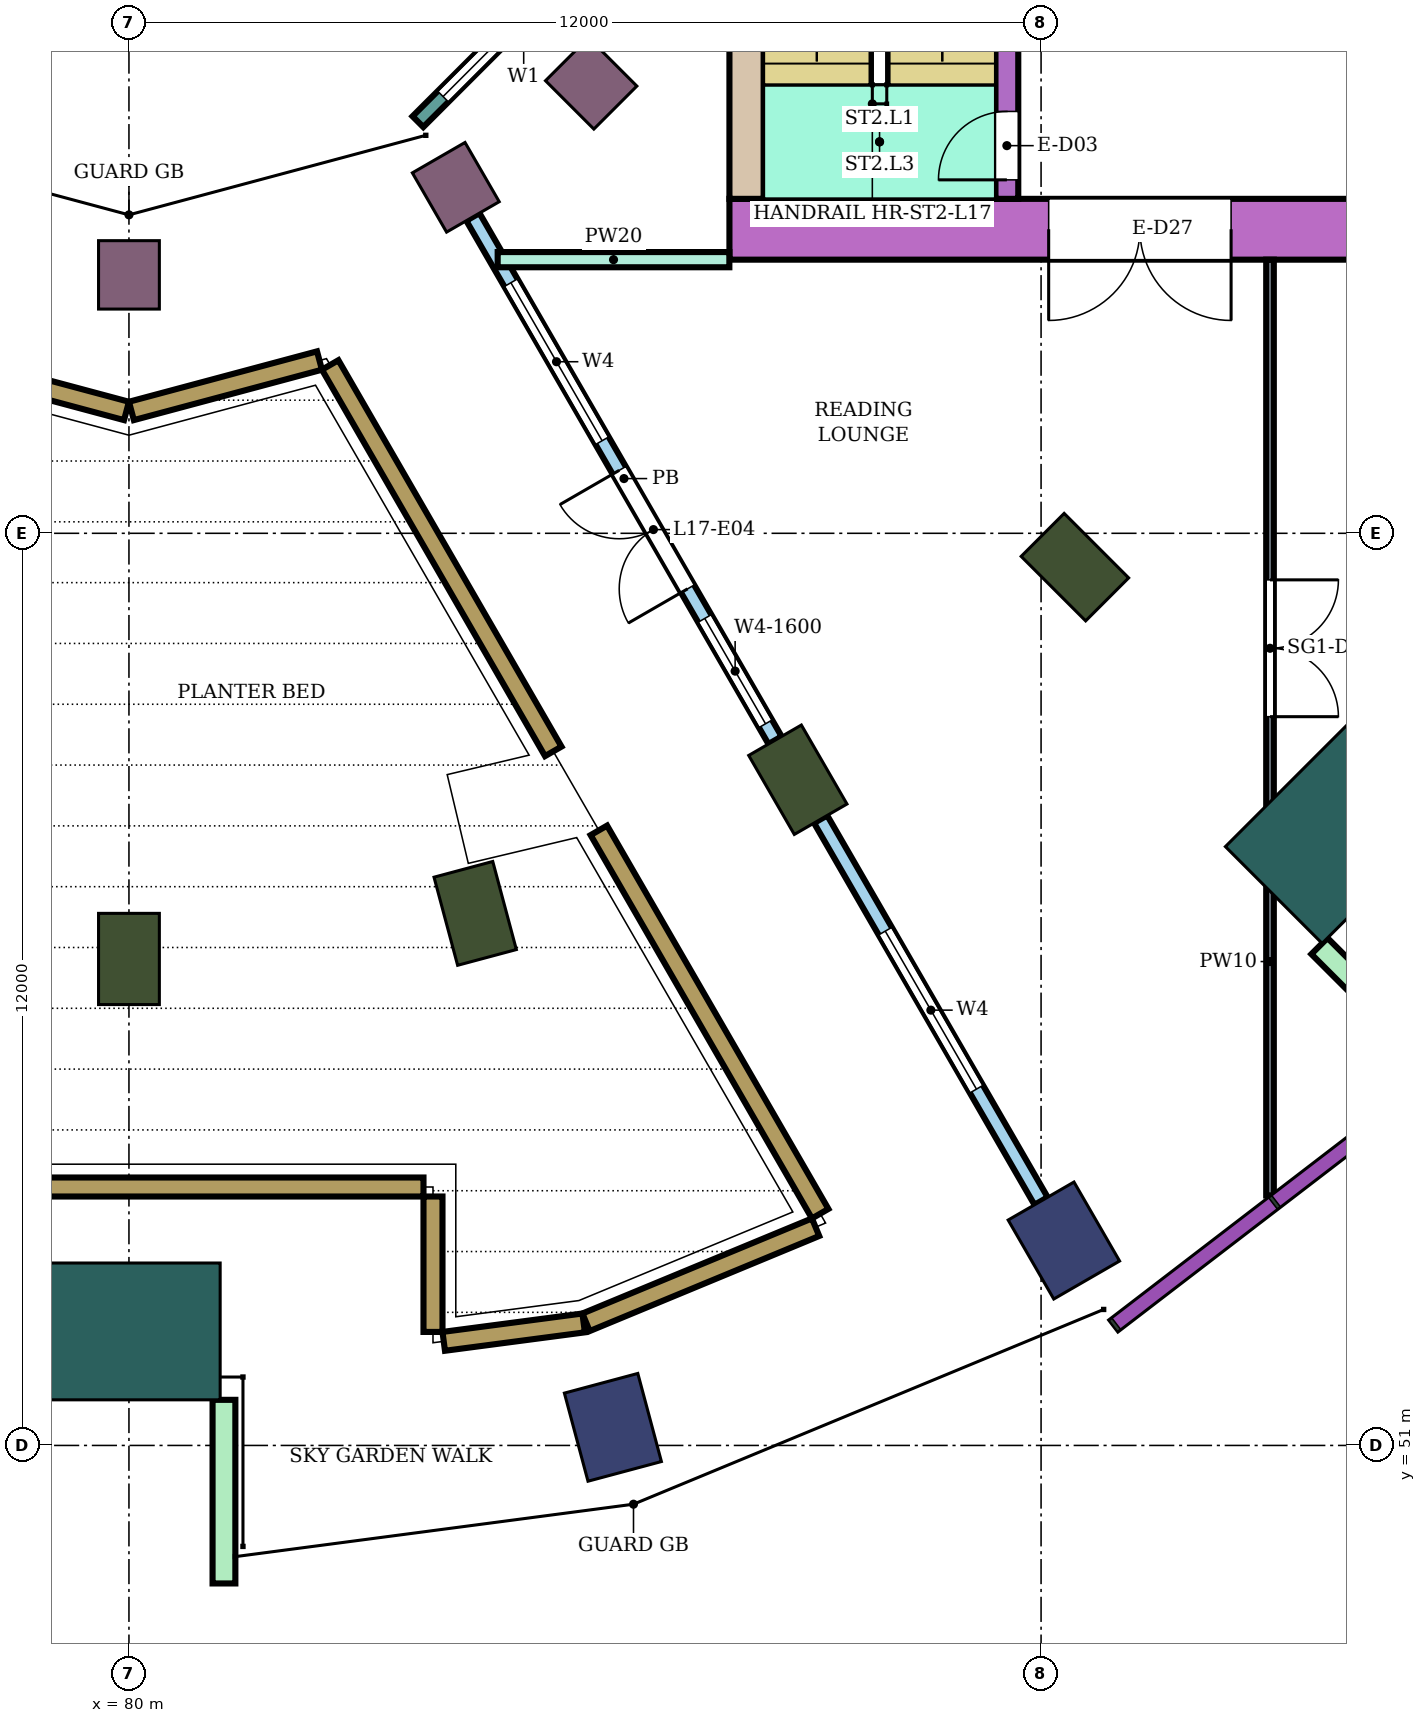
"""IFC4 building model, lengths in metres.
Left out: names, types, materials, properties, quantities, classifications, styles, units other than length and angle.
Written with IfcOpenShell. Run it as: python <this file> out.ifc"""

import sys

from ifc_helpers import new_model, si_unit, direction, frame, frame_2d, origin, origin_2d, place, context, subcontext, project, spatial, rectangle, extrude, element, fill, save


model = new_model("IFC4")
c1 = context("Model", 3, precision=1e-05, world=origin(), true_north=direction((0.0, 1.0)))
c2 = subcontext(c1, "Body", "Model", "MODEL_VIEW")
j1 = project(units=[si_unit("LENGTHUNIT", "METRE"), si_unit("PLANEANGLEUNIT", "RADIAN")], contexts=[c1])
p1 = place(None, origin())
s1 = spatial("IfcSite", under=j1, at=p1, CompositionType="ELEMENT")
p2 = place(p1, origin())
s2 = spatial("IfcBuilding", under=s1, at=p2, CompositionType="ELEMENT")
p3 = place(p2, frame((0.0, 0.0, 74.4)))
s3 = spatial("IfcBuildingStorey", under=s2, at=p3, CompositionType="ELEMENT", Elevation=74.4)
for number, where, z_axis, x_axis in (
    (1, (86.367, 51.238, 0.0), (0.0, 0.0, 1.0), (0.259, -0.966, 0.0)),
    (2, (92.3, 53.696, 0.0), (0.0, 0.0, 1.0), (0.5, -0.866, 0.0)),
):
    element("IfcColumn", number, at=place(p3, frame(where, z_axis=z_axis, x_axis=x_axis)), inside=s3, PredefinedType="COLUMN", context=c2, shape_type="SweptSolid", body=[
        extrude(rectangle(XDim=1.2, YDim=1.0, at=origin_2d()), origin(), (0.0, 0.0, 1.0), 8.0),
    ])
for number, where, z_axis, x_axis in (
    (3, (80.0, 57.4, 0.0), (0.0, 0.0, 1.0), (0.0, -1.0, 0.0)),
    (4, (84.555, 58.0, 0.0), (0.0, 0.0, 1.0), (0.259, -0.966, 0.0)),
    (5, (88.8, 59.758, 0.0), (0.0, 0.0, 1.0), (0.5, -0.866, 0.0)),
    (6, (92.445, 62.555, 0.0), (0.0, 0.0, 1.0), (0.707, -0.707, 0.0)),
):
    element("IfcColumn", number, at=place(p3, frame(where, z_axis=z_axis, x_axis=x_axis)), inside=s3, PredefinedType="COLUMN", context=c2, shape_type="SweptSolid", body=[
        extrude(rectangle(XDim=1.2, YDim=0.8, at=origin_2d()), origin(), (0.0, 0.0, 1.0), 8.0),
    ])
for number, where, z_axis, x_axis in (
    (7, (80.0, 66.4, 0.0), (0.0, 0.0, 1.0), (0.0, -1.0, 0.0)),
    (8, (84.3, 67.552, 0.0), (0.0, 0.0, 1.0), (0.5, -0.866, 0.0)),
    (9, (86.081, 68.919, 0.0), (0.0, 0.0, 1.0), (0.707, -0.707, 0.0)),
):
    element("IfcColumn", number, at=place(p3, frame(where, z_axis=z_axis, x_axis=x_axis)), inside=s3, PredefinedType="COLUMN", context=c2, shape_type="SweptSolid", body=[
        extrude(rectangle(XDim=0.9, YDim=0.8, at=origin_2d()), origin(), (0.0, 0.0, 1.0), 8.0),
    ])
for number, where, z_axis, x_axis in (
    (10, (80.0, 52.5, 0.0), (0.0, 0.0, 1.0), (0.0, -1.0, 0.0)),
    (11, (95.91, 59.09, 0.0), (0.0, 0.0, 1.0), (0.707, -0.707, 0.0)),
):
    element("IfcColumn", number, at=place(p3, frame(where, z_axis=z_axis, x_axis=x_axis)), inside=s3, PredefinedType="COLUMN", context=c2, shape_type="SweptSolid", body=[
        extrude(rectangle(XDim=1.8, YDim=2.4, at=origin_2d()), origin(), (0.0, 0.0, 1.0), 8.0),
    ])
p4 = place(p3, frame((87.9, 67.0, 0.0), z_axis=(0.0, 0.0, 1.0), x_axis=(1.0, 0.0, 0.0)))
e12 = element("IfcWall", 12, at=p4, inside=s3, PredefinedType="SHEAR", context=c2, shape_type="SweptSolid", body=[
    extrude(rectangle(XDim=14.7, YDim=0.8, at=frame_2d((7.35, 0.0))), origin(), (0.0, 0.0, 1.0), 7.68),
])
p5 = place(p4, frame((4.2, 0.0, 0.0)))
e13 = element("IfcOpeningElement", 13, at=p5, cuts=e12, PredefinedType="OPENING", context=c2, shape_type="SweptSolid", body=[
    extrude(rectangle(XDim=2.4, YDim=2.4, at=frame_2d((1.2, 1.2))), frame((0.0, 0.41, 0.0), z_axis=(0.0, -1.0, 0.0), x_axis=(1.0, 0.0, 0.0)), (0.0, 0.0, 1.0), 0.82),
])
p6 = place(p3, frame((88.125, 67.4, 0.0), z_axis=(0.0, 0.0, 1.0), x_axis=(0.0, 1.0, 0.0)))
e14 = element("IfcWall", 14, at=p6, inside=s3, PredefinedType="SHEAR", context=c2, shape_type="SweptSolid", body=[
    extrude(rectangle(XDim=7.6, YDim=0.45, at=frame_2d((3.8, 0.0))), origin(), (0.0, 0.0, 1.0), 7.68),
])
p7 = place(p3, frame((91.55, 67.4, 0.0), z_axis=(0.0, 0.0, 1.0), x_axis=(0.0, 1.0, 0.0)))
e15 = element("IfcWall", 15, at=p7, inside=s3, PredefinedType="SHEAR", context=c2, shape_type="SweptSolid", body=[
    extrude(rectangle(XDim=7.6, YDim=0.3, at=frame_2d((3.8, 0.0))), origin(), (0.0, 0.0, 1.0), 7.68),
])
p8 = place(p7, frame((0.25, 0.0, 0.0)))
e16 = element("IfcOpeningElement", 16, at=p8, cuts=e15, PredefinedType="OPENING", context=c2, shape_type="SweptSolid", body=[
    extrude(rectangle(XDim=0.9, YDim=2.1, at=frame_2d((0.45, 1.05))), frame((0.0, 0.16, 0.0), z_axis=(0.0, -1.0, 0.0), x_axis=(1.0, 0.0, 0.0)), (0.0, 0.0, 1.0), 0.32),
])
for number, where, z_axis, x_axis in (
    (17, (81.25, 51.6, 0.0), (0.0, 0.0, 1.0), (0.0, -1.0, 0.0)),
    (18, (95.662, 57.57, 0.0), (0.0, 0.0, 1.0), (0.707, -0.707, 0.0)),
):
    element("IfcWall", number, at=place(p3, frame(where, z_axis=z_axis, x_axis=x_axis)), inside=s3, PredefinedType="NOTDEFINED", context=c2, shape_type="SweptSolid", body=[
        extrude(rectangle(XDim=2.416, YDim=0.3, at=frame_2d((1.208, 0.0))), origin(), (0.0, 0.0, 1.0), 8.0),
    ])
p9 = place(p3, frame((83.802, 68.415, 0.0), z_axis=(0.0, 0.0, 1.0), x_axis=(0.707106781187, 0.707106781187, 0.0)))
e19 = element("IfcWall", 19, at=p9, inside=s3, PredefinedType="NOTDEFINED", context=c2, shape_type="SweptSolid", body=[
    extrude(rectangle(XDim=3.936, YDim=0.2, at=frame_2d((1.968, 0.0))), origin(), (0.0, 0.0, 1.0), 8.0),
])
p10 = place(p9, frame((0.468, 0.0, 0.9)))
e20 = element("IfcOpeningElement", 20, at=p10, cuts=e19, PredefinedType="OPENING", context=c2, shape_type="SweptSolid", body=[
    extrude(rectangle(XDim=3.0, YDim=2.3, at=frame_2d((1.5, 1.15))), frame((0.0, 0.11, 0.0), z_axis=(0.0, -1.0, 0.0), x_axis=(1.0, 0.0, 0.0)), (0.0, 0.0, 1.0), 0.22),
])
p11 = place(p3, frame((76.125, 54.4, 0.0), z_axis=(0.0, 0.0, 1.0), x_axis=(1.0, 0.0, 0.0)))
e21 = element("IfcWall", 21, at=p11, inside=s3, PredefinedType="USERDEFINED", context=c2, shape_type="SweptSolid", body=[
    extrude(rectangle(XDim=7.75, YDim=0.25, at=frame_2d((3.875, 0.0))), origin(), (0.0, 0.0, 1.0), 0.6),
])
p12 = place(p3, frame((84.0, 54.275, 0.0), z_axis=(0.0, 0.0, 1.0), x_axis=(0.0, -1.0, 0.0)))
e22 = element("IfcWall", 22, at=p12, inside=s3, PredefinedType="USERDEFINED", context=c2, shape_type="SweptSolid", body=[
    extrude(rectangle(XDim=1.781, YDim=0.25, at=frame_2d((0.891, 0.0))), origin(), (0.0, 0.0, 1.0), 0.6),
])
p13 = place(p3, frame((84.141, 52.369, 0.0), z_axis=(0.0, 0.0, 1.0), x_axis=(0.991436829887, 0.130587182926, 0.0)))
e23 = element("IfcWall", 23, at=p13, inside=s3, PredefinedType="USERDEFINED", context=c2, shape_type="SweptSolid", body=[
    extrude(rectangle(XDim=1.856, YDim=0.25, at=frame_2d((0.928, 0.0))), origin(), (0.0, 0.0, 1.0), 0.6),
])
p14 = place(p3, frame((86.014, 52.62, 0.0), z_axis=(0.0, 0.0, 1.0), x_axis=(0.923863886655, 0.382721202621, 0.0)))
e24 = element("IfcWall", 24, at=p14, inside=s3, PredefinedType="USERDEFINED", context=c2, shape_type="SweptSolid", body=[
    extrude(rectangle(XDim=3.269, YDim=0.25, at=frame_2d((1.634, 0.0))), origin(), (0.0, 0.0, 1.0), 0.6),
])
p15 = place(p3, frame((89.094, 54.049, 0.0), z_axis=(0.0, 0.0, 1.0), x_axis=(-0.50000795037, 0.866020813587, 0.0)))
e25 = element("IfcWall", 25, at=p15, inside=s3, PredefinedType="USERDEFINED", context=c2, shape_type="SweptSolid", body=[
    extrude(rectangle(XDim=5.823, YDim=0.25, at=frame_2d((2.912, 0.0))), origin(), (0.0, 0.0, 1.0), 0.6),
])
p16 = place(p3, frame((85.582, 60.131, 0.0), z_axis=(0.0, 0.0, 1.0), x_axis=(-0.499999689456, 0.866025583077, 0.0)))
e26 = element("IfcWall", 26, at=p16, inside=s3, PredefinedType="USERDEFINED", context=c2, shape_type="SweptSolid", body=[
    extrude(rectangle(XDim=5.87, YDim=0.25, at=frame_2d((2.935, 0.0))), origin(), (0.0, 0.0, 1.0), 0.6),
])
for number, where, z_axis, x_axis in (
    (27, (82.507, 65.273, 0.0), (0.0, 0.0, 1.0), (-0.966, -0.259, 0.0)),
    (28, (79.968, 64.61, 0.0), (0.0, 0.0, 1.0), (-0.966, 0.259, 0.0)),
):
    element("IfcWall", number, at=place(p3, frame(where, z_axis=z_axis, x_axis=x_axis)), inside=s3, PredefinedType="USERDEFINED", context=c2, shape_type="SweptSolid", body=[
        extrude(rectangle(XDim=2.562, YDim=0.25, at=frame_2d((1.281, 0.0))), origin(), (0.0, 0.0, 1.0), 0.6),
    ])
p17 = place(p3, frame((84.525, 67.162, 0.0), z_axis=(0.0, 0.0, 1.0), x_axis=(0.50001663867, -0.86601579723, 0.0)))
e29 = element("IfcWall", 29, at=p17, inside=s3, PredefinedType="NOTDEFINED", context=c2, shape_type="SweptSolid", body=[
    extrude(rectangle(XDim=7.95, YDim=0.2, at=frame_2d((3.975, 0.0))), origin(), (0.0, 0.0, 1.0), 8.0),
])
p18 = place(p17, frame((1.0, 0.0, 0.3)))
e30 = element("IfcOpeningElement", 30, at=p18, cuts=e29, PredefinedType="OPENING", context=c2, shape_type="SweptSolid", body=[
    extrude(rectangle(XDim=2.4, YDim=3.6, at=frame_2d((1.2, 1.8))), frame((0.0, 0.11, 0.0), z_axis=(0.0, -1.0, 0.0), x_axis=(1.0, 0.0, 0.0)), (0.0, 0.0, 1.0), 0.22),
])
p19 = place(p17, frame((3.85, 0.0, 0.0)))
e31 = element("IfcOpeningElement", 31, at=p19, cuts=e29, PredefinedType="OPENING", context=c2, shape_type="SweptSolid", body=[
    extrude(rectangle(XDim=1.8, YDim=2.4, at=frame_2d((0.9, 1.2))), frame((0.0, 0.11, 0.0), z_axis=(0.0, -1.0, 0.0), x_axis=(1.0, 0.0, 0.0)), (0.0, 0.0, 1.0), 0.22),
])
p20 = place(p17, frame((6.1, 0.0, 0.3)))
e32 = element("IfcOpeningElement", 32, at=p20, cuts=e29, PredefinedType="OPENING", context=c2, shape_type="SweptSolid", body=[
    extrude(rectangle(XDim=1.6, YDim=3.6, at=frame_2d((0.8, 1.8))), frame((0.0, 0.11, 0.0), z_axis=(0.0, -1.0, 0.0), x_axis=(1.0, 0.0, 0.0)), (0.0, 0.0, 1.0), 0.22),
])
p21 = place(p3, frame((89.1, 59.238, 0.0), z_axis=(0.0, 0.0, 1.0), x_axis=(0.499987231761, -0.866032775405, 0.0)))
e33 = element("IfcWall", 33, at=p21, inside=s3, PredefinedType="NOTDEFINED", context=c2, shape_type="SweptSolid", body=[
    extrude(rectangle(XDim=5.8, YDim=0.2, at=frame_2d((2.9, 0.0))), origin(), (0.0, 0.0, 1.0), 8.0),
])
p22 = place(p21, frame((1.7, 0.0, 0.3)))
e34 = element("IfcOpeningElement", 34, at=p22, cuts=e33, PredefinedType="OPENING", context=c2, shape_type="SweptSolid", body=[
    extrude(rectangle(XDim=2.4, YDim=3.6, at=frame_2d((1.2, 1.8))), frame((0.0, 0.11, 0.0), z_axis=(0.0, -1.0, 0.0), x_axis=(1.0, 0.0, 0.0)), (0.0, 0.0, 1.0), 0.22),
])
p23 = place(p3, frame((84.851, 66.6, 0.0), z_axis=(0.0, 0.0, 1.0), x_axis=(1.0, 0.0, 0.0)))
e35 = element("IfcWall", 35, at=p23, inside=s3, PredefinedType="PARTITIONING", context=c2, shape_type="SweptSolid", body=[
    extrude(rectangle(XDim=3.048, YDim=0.2, at=frame_2d((1.524, 0.0))), origin(), (0.0, 0.0, 1.0), 7.55),
])
p24 = place(p3, frame((95.012, 54.288, 0.0), z_axis=(0.0, 0.0, 1.0), x_axis=(0.0, 1.0, 0.0)))
e36 = element("IfcWall", 36, at=p24, inside=s3, PredefinedType="PARTITIONING", context=c2, shape_type="SweptSolid", body=[
    extrude(rectangle(XDim=12.312, YDim=0.1, at=frame_2d((6.156, 0.0))), origin(), (0.0, 0.0, 1.0), 7.55),
])
p25 = place(p24, frame((6.3, 0.0, 0.0)))
e37 = element("IfcOpeningElement", 37, at=p25, cuts=e36, PredefinedType="OPENING", context=c2, shape_type="SweptSolid", body=[
    extrude(rectangle(XDim=1.8, YDim=2.1, at=frame_2d((0.9, 1.05))), frame((0.0, 0.06, 0.0), z_axis=(0.0, -1.0, 0.0), x_axis=(1.0, 0.0, 0.0)), (0.0, 0.0, 1.0), 0.12),
])
p26 = place(p10, origin())
e38 = element("IfcWindow", 38, at=p26, inside=s3, PartitioningType="SINGLE_PANEL", PredefinedType="WINDOW", context=c2, shape_type="SweptSolid", body=[
    extrude(rectangle(XDim=3.0, YDim=2.3, at=frame_2d((1.5, 1.15))), frame((0.0, 0.03, 0.0), z_axis=(0.0, -1.0, 0.0), x_axis=(1.0, 0.0, 0.0)), (0.0, 0.0, 1.0), 0.06),
])
fill(e20, e38)
p27 = place(p18, origin())
e39 = element("IfcWindow", 39, at=p27, inside=s3, PartitioningType="SINGLE_PANEL", PredefinedType="WINDOW", context=c2, shape_type="SweptSolid", body=[
    extrude(rectangle(XDim=2.4, YDim=3.6, at=frame_2d((1.2, 1.8))), frame((0.0, 0.03, 0.0), z_axis=(0.0, -1.0, 0.0), x_axis=(1.0, 0.0, 0.0)), (0.0, 0.0, 1.0), 0.06),
])
fill(e30, e39)
p28 = place(p19, frame((1.8, 0.0, 0.0), z_axis=(0.0, 0.0, 1.0), x_axis=(-1.0, 0.0, 0.0)))
e40 = element("IfcDoor", 40, at=p28, inside=s3, OperationType="DOUBLE_DOOR_SINGLE_SWING", PredefinedType="DOOR", context=c2, shape_type="SweptSolid", body=[
    extrude(rectangle(XDim=1.8, YDim=2.4, at=frame_2d((0.9, 1.2))), frame((0.0, 0.025, 0.0), z_axis=(0.0, -1.0, 0.0), x_axis=(1.0, 0.0, 0.0)), (0.0, 0.0, 1.0), 0.05),
])
fill(e31, e40)
p29 = place(p20, origin())
e41 = element("IfcWindow", 41, at=p29, inside=s3, PartitioningType="SINGLE_PANEL", PredefinedType="WINDOW", context=c2, shape_type="SweptSolid", body=[
    extrude(rectangle(XDim=1.6, YDim=3.6, at=frame_2d((0.8, 1.8))), frame((0.0, 0.03, 0.0), z_axis=(0.0, -1.0, 0.0), x_axis=(1.0, 0.0, 0.0)), (0.0, 0.0, 1.0), 0.06),
])
fill(e32, e41)
p30 = place(p22, origin())
e42 = element("IfcWindow", 42, at=p30, inside=s3, PartitioningType="SINGLE_PANEL", PredefinedType="WINDOW", context=c2, shape_type="SweptSolid", body=[
    extrude(rectangle(XDim=2.4, YDim=3.6, at=frame_2d((1.2, 1.8))), frame((0.0, 0.03, 0.0), z_axis=(0.0, -1.0, 0.0), x_axis=(1.0, 0.0, 0.0)), (0.0, 0.0, 1.0), 0.06),
])
fill(e34, e42)
p31 = place(p25, frame((1.8, 0.0, 0.0), z_axis=(0.0, 0.0, 1.0), x_axis=(-1.0, 0.0, 0.0)))
e43 = element("IfcDoor", 43, at=p31, inside=s3, OperationType="DOUBLE_DOOR_SINGLE_SWING", PredefinedType="DOOR", context=c2, shape_type="SweptSolid", body=[
    extrude(rectangle(XDim=1.8, YDim=2.1, at=frame_2d((0.9, 1.05))), frame((0.0, 0.025, 0.0), z_axis=(0.0, -1.0, 0.0), x_axis=(1.0, 0.0, 0.0)), (0.0, 0.0, 1.0), 0.05),
])
fill(e37, e43)
p32 = place(p8, origin())
e44 = element("IfcDoor", 44, at=p32, inside=s3, OperationType="SINGLE_SWING_LEFT", PredefinedType="DOOR", context=c2, shape_type="SweptSolid", body=[
    extrude(rectangle(XDim=0.9, YDim=2.1, at=frame_2d((0.45, 1.05))), frame((0.0, 0.025, 0.0), z_axis=(0.0, -1.0, 0.0), x_axis=(1.0, 0.0, 0.0)), (0.0, 0.0, 1.0), 0.05),
])
fill(e16, e44)
p33 = place(p5, frame((2.4, 0.0, 0.0), z_axis=(0.0, 0.0, 1.0), x_axis=(-1.0, 0.0, 0.0)))
e45 = element("IfcDoor", 45, at=p33, inside=s3, OperationType="DOUBLE_DOOR_SINGLE_SWING", PredefinedType="DOOR", context=c2, shape_type="SweptSolid", body=[
    extrude(rectangle(XDim=2.4, YDim=2.4, at=frame_2d((1.2, 1.2))), frame((0.0, 0.025, 0.0), z_axis=(0.0, -1.0, 0.0), x_axis=(1.0, 0.0, 0.0)), (0.0, 0.0, 1.0), 0.05),
])
fill(e13, e45)
save(model, sys.argv[1])
